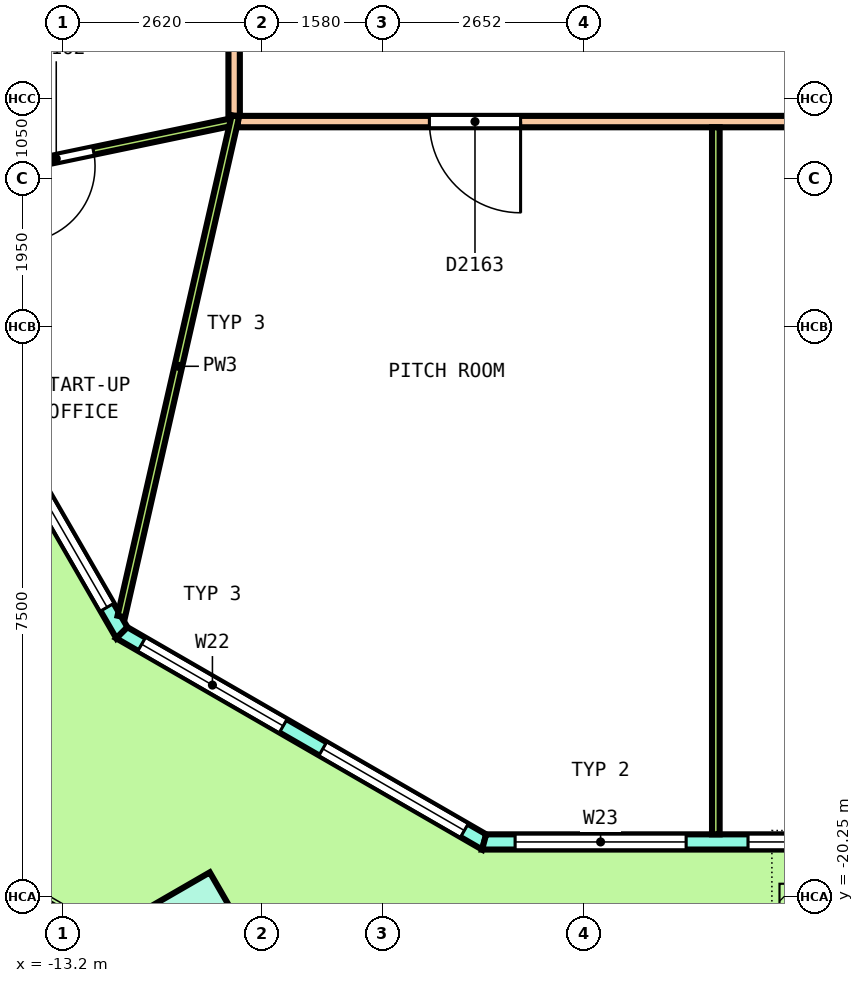
"""IFC4 building model, lengths in metres.
Left out: names, types, materials, properties, quantities, classifications, styles, units other than length and angle.
Written with IfcOpenShell. Run it as: python <this file> out.ifc"""

import sys

from ifc_helpers import new_model, si_unit, direction, frame, frame_2d, origin, origin_2d, place, context, subcontext, project, spatial, polyline, rectangle, outline, extrude, element, fill, save


model = new_model("IFC4")
c1 = context("Model", 3, precision=1e-05, world=origin(), true_north=direction((0.0, 1.0)))
c2 = subcontext(c1, "Body", "Model", "MODEL_VIEW")
j1 = project(units=[si_unit("LENGTHUNIT", "METRE"), si_unit("PLANEANGLEUNIT", "RADIAN")], contexts=[c1])
p1 = place(None, origin())
s1 = spatial("IfcSite", under=j1, at=p1, CompositionType="ELEMENT")
p2 = place(p1, origin())
s2 = spatial("IfcBuilding", under=s1, at=p2, CompositionType="ELEMENT")
p3 = place(p2, frame((0.0, 0.0, 275.0)))
s3 = spatial("IfcBuildingStorey", under=s2, at=p3, CompositionType="ELEMENT", Elevation=275.0)
p4 = place(p3, frame((-11.444, -20.576, 0.0), z_axis=(0.018115165867, -0.031417446337, 0.999342176049), x_axis=(0.865519692755, -0.499889378995, -0.031404939456)))
e1 = element("IfcColumn", 1, at=p4, inside=s3, PredefinedType="COLUMN", context=c2, shape_type="SweptSolid", body=[
    extrude(rectangle(XDim=0.95, YDim=0.95, at=origin_2d()), origin(), (0.0, 0.0, 1.0), 3.652),
])
p5 = place(p3, frame((-20.741, -2.375, 0.0), z_axis=(0.0, 0.0, 1.0), x_axis=(0.499993580544, -0.866029110027, 0.0)))
e2 = element("IfcWall", 2, at=p5, inside=s3, PredefinedType="SOLIDWALL", context=c2, shape_type="SweptSolid", body=[
    extrude(outline(polyline([(-0.027, -0.1), (1.016, -0.1), (2.058, -0.1), (3.101, -0.1), (4.144, -0.1), (5.186, -0.1), (6.229, -0.1), (7.272, -0.1), (8.314, -0.1), (9.357, -0.1), (10.4, -0.1), (11.442, -0.1), (12.485, -0.1), (13.528, -0.1), (14.57, -0.1), (15.613, -0.1), (16.656, -0.1), (16.602, 0.1), (15.566, 0.1), (14.53, 0.1), (13.494, 0.1), (12.458, 0.1), (11.422, 0.1), (10.386, 0.1), (9.35, 0.1), (8.314, 0.1), (7.278, 0.1), (6.242, 0.1), (5.207, 0.1), (4.171, 0.1), (3.135, 0.1), (2.099, 0.1), (1.063, 0.1), (0.027, 0.1), (-0.027, -0.1)])), origin(), (0.0, 0.0, 1.0), 3.7),
])
p6 = place(p5, frame((0.388, 0.0, 0.1)))
e3 = element("IfcOpeningElement", 3, at=p6, cuts=e2, PredefinedType="OPENING", context=c2, shape_type="SweptSolid", body=[
    extrude(rectangle(XDim=2.55, YDim=2.75, at=frame_2d((1.275, 1.375))), frame((0.0, 0.11, 0.0), z_axis=(0.0, -1.0, 0.0), x_axis=(1.0, 0.0, 0.0)), (0.0, 0.0, 1.0), 0.22),
])
p7 = place(p5, frame((3.714, 0.0, 0.1)))
e4 = element("IfcOpeningElement", 4, at=p7, cuts=e2, PredefinedType="OPENING", context=c2, shape_type="SweptSolid", body=[
    extrude(rectangle(XDim=2.55, YDim=2.75, at=frame_2d((1.275, 1.375))), frame((0.0, 0.11, 0.0), z_axis=(0.0, -1.0, 0.0), x_axis=(1.0, 0.0, 0.0)), (0.0, 0.0, 1.0), 0.22),
])
p8 = place(p5, frame((7.414, 0.0, 0.0)))
e5 = element("IfcOpeningElement", 5, at=p8, cuts=e2, PredefinedType="OPENING", context=c2, shape_type="SweptSolid", body=[
    extrude(rectangle(XDim=1.8, YDim=2.4, at=frame_2d((0.9, 1.2))), frame((0.0, 0.11, 0.0), z_axis=(0.0, -1.0, 0.0), x_axis=(1.0, 0.0, 0.0)), (0.0, 0.0, 1.0), 0.22),
])
p9 = place(p5, frame((7.414, 0.0, 2.55)))
e6 = element("IfcOpeningElement", 6, at=p9, cuts=e2, PredefinedType="OPENING", context=c2, shape_type="SweptSolid", body=[
    extrude(rectangle(XDim=1.8, YDim=0.3, at=frame_2d((0.9, 0.15))), frame((0.0, 0.11, 0.0), z_axis=(0.0, -1.0, 0.0), x_axis=(1.0, 0.0, 0.0)), (0.0, 0.0, 1.0), 0.22),
])
p10 = place(p5, frame((10.365, 0.0, 0.1)))
e7 = element("IfcOpeningElement", 7, at=p10, cuts=e2, PredefinedType="OPENING", context=c2, shape_type="SweptSolid", body=[
    extrude(rectangle(XDim=2.55, YDim=2.75, at=frame_2d((1.275, 1.375))), frame((0.0, 0.11, 0.0), z_axis=(0.0, -1.0, 0.0), x_axis=(1.0, 0.0, 0.0)), (0.0, 0.0, 1.0), 0.22),
])
p11 = place(p5, frame((13.691, 0.0, 0.1)))
e8 = element("IfcOpeningElement", 8, at=p11, cuts=e2, PredefinedType="OPENING", context=c2, shape_type="SweptSolid", body=[
    extrude(rectangle(XDim=2.55, YDim=2.75, at=frame_2d((1.275, 1.375))), frame((0.0, 0.11, 0.0), z_axis=(0.0, -1.0, 0.0), x_axis=(1.0, 0.0, 0.0)), (0.0, 0.0, 1.0), 0.22),
])
p12 = place(p3, frame((-12.427, -16.775, 0.0), z_axis=(0.0, 0.0, 1.0), x_axis=(0.866026017613, -0.499998936816, 0.0)))
e9 = element("IfcWall", 9, at=p12, inside=s3, PredefinedType="SOLIDWALL", context=c2, shape_type="SweptSolid", body=[
    extrude(outline(polyline([(-0.027, -0.1), (1.084, -0.1), (2.196, -0.1), (3.307, -0.1), (4.419, -0.1), (5.53, -0.1), (5.477, 0.1), (4.387, 0.1), (3.297, 0.1), (2.207, 0.1), (1.117, 0.1), (0.027, 0.1), (-0.027, -0.1)])), origin(), (0.0, 0.0, 1.0), 3.7),
])
p13 = place(p12, frame((0.301, 0.0, 0.1)))
e10 = element("IfcOpeningElement", 10, at=p13, cuts=e9, PredefinedType="OPENING", context=c2, shape_type="SweptSolid", body=[
    extrude(rectangle(XDim=2.15, YDim=2.75, at=frame_2d((1.075, 1.375))), frame((0.0, 0.11, 0.0), z_axis=(0.0, -1.0, 0.0), x_axis=(1.0, 0.0, 0.0)), (0.0, 0.0, 1.0), 0.22),
])
p14 = place(p12, frame((3.052, 0.0, 0.1)))
e11 = element("IfcOpeningElement", 11, at=p14, cuts=e9, PredefinedType="OPENING", context=c2, shape_type="SweptSolid", body=[
    extrude(rectangle(XDim=2.15, YDim=2.75, at=frame_2d((1.075, 1.375))), frame((0.0, 0.11, 0.0), z_axis=(0.0, -1.0, 0.0), x_axis=(1.0, 0.0, 0.0)), (0.0, 0.0, 1.0), 0.22),
])
p15 = place(p3, frame((-7.661, -19.527, 0.0), z_axis=(0.0, 0.0, 1.0), x_axis=(1.0, 0.0, 0.0)))
e12 = element("IfcWall", 12, at=p15, inside=s3, PredefinedType="SOLIDWALL", context=c2, shape_type="SweptSolid", body=[
    extrude(outline(polyline([(-0.027, -0.1), (0.998, -0.1), (2.023, -0.1), (3.048, -0.1), (4.073, -0.1), (5.098, -0.1), (6.124, -0.1), (7.149, -0.1), (8.174, -0.1), (9.199, -0.1), (10.224, -0.1), (11.249, -0.1), (12.274, -0.1), (13.299, -0.1), (14.324, -0.1), (15.349, -0.1), (15.295, 0.1), (14.278, 0.1), (13.26, 0.1), (12.242, 0.1), (11.224, 0.1), (10.206, 0.1), (9.188, 0.1), (8.17, 0.1), (7.152, 0.1), (6.134, 0.1), (5.116, 0.1), (4.098, 0.1), (3.081, 0.1), (2.063, 0.1), (1.045, 0.1), (0.027, 0.1), (-0.027, -0.1)])), origin(), (0.0, 0.0, 1.0), 3.7),
])
p16 = place(p15, frame((0.407, 0.0, 0.1)))
e13 = element("IfcOpeningElement", 13, at=p16, cuts=e12, PredefinedType="OPENING", context=c2, shape_type="SweptSolid", body=[
    extrude(rectangle(XDim=2.25, YDim=2.75, at=frame_2d((1.125, 1.375))), frame((0.0, 0.11, 0.0), z_axis=(0.0, -1.0, 0.0), x_axis=(1.0, 0.0, 0.0)), (0.0, 0.0, 1.0), 0.22),
])
p17 = place(p15, frame((3.472, 0.0, 0.1)))
e14 = element("IfcOpeningElement", 14, at=p17, cuts=e12, PredefinedType="OPENING", context=c2, shape_type="SweptSolid", body=[
    extrude(rectangle(XDim=2.25, YDim=2.75, at=frame_2d((1.125, 1.375))), frame((0.0, 0.11, 0.0), z_axis=(0.0, -1.0, 0.0), x_axis=(1.0, 0.0, 0.0)), (0.0, 0.0, 1.0), 0.22),
])
p18 = place(p15, frame((6.761, 0.0, 0.0)))
e15 = element("IfcOpeningElement", 15, at=p18, cuts=e12, PredefinedType="OPENING", context=c2, shape_type="SweptSolid", body=[
    extrude(rectangle(XDim=1.8, YDim=2.4, at=frame_2d((0.9, 1.2))), frame((0.0, 0.11, 0.0), z_axis=(0.0, -1.0, 0.0), x_axis=(1.0, 0.0, 0.0)), (0.0, 0.0, 1.0), 0.22),
])
p19 = place(p15, frame((6.761, 0.0, 2.55)))
e16 = element("IfcOpeningElement", 16, at=p19, cuts=e12, PredefinedType="OPENING", context=c2, shape_type="SweptSolid", body=[
    extrude(rectangle(XDim=1.8, YDim=0.3, at=frame_2d((0.9, 0.15))), frame((0.0, 0.11, 0.0), z_axis=(0.0, -1.0, 0.0), x_axis=(1.0, 0.0, 0.0)), (0.0, 0.0, 1.0), 0.22),
])
p20 = place(p15, frame((9.601, 0.0, 0.1)))
e17 = element("IfcOpeningElement", 17, at=p20, cuts=e12, PredefinedType="OPENING", context=c2, shape_type="SweptSolid", body=[
    extrude(rectangle(XDim=2.25, YDim=2.75, at=frame_2d((1.125, 1.375))), frame((0.0, 0.11, 0.0), z_axis=(0.0, -1.0, 0.0), x_axis=(1.0, 0.0, 0.0)), (0.0, 0.0, 1.0), 0.22),
])
p21 = place(p15, frame((12.665, 0.0, 0.1)))
e18 = element("IfcOpeningElement", 18, at=p21, cuts=e12, PredefinedType="OPENING", context=c2, shape_type="SweptSolid", body=[
    extrude(rectangle(XDim=2.25, YDim=2.75, at=frame_2d((1.125, 1.375))), frame((0.0, 0.11, 0.0), z_axis=(0.0, -1.0, 0.0), x_axis=(1.0, 0.0, 0.0)), (0.0, 0.0, 1.0), 0.22),
])
p22 = place(p3, frame((-10.95, -9.975, 0.0), z_axis=(0.0, 0.0, 1.0), x_axis=(0.0, 1.0, 0.0)))
e19 = element("IfcWall", 19, at=p22, inside=s3, PredefinedType="PARTITIONING", context=c2, shape_type="SweptSolid", body=[
    extrude(rectangle(XDim=17.15, YDim=0.15, at=frame_2d((8.575, 0.0))), origin(), (0.0, 0.0, 1.0), 2.9),
])
p23 = place(p22, frame((13.004, 0.0, 0.0)))
e20 = element("IfcOpeningElement", 20, at=p23, cuts=e19, PredefinedType="OPENING", context=c2, shape_type="SweptSolid", body=[
    extrude(rectangle(XDim=1.2, YDim=2.1, at=frame_2d((0.6, 1.05))), frame((0.0, 0.085, 0.0), z_axis=(0.0, -1.0, 0.0), x_axis=(1.0, 0.0, 0.0)), (0.0, 0.0, 1.0), 0.17),
])
p24 = place(p22, frame((7.86, 0.0, 0.0)))
e21 = element("IfcOpeningElement", 21, at=p24, cuts=e19, PredefinedType="OPENING", context=c2, shape_type="SweptSolid", body=[
    extrude(rectangle(XDim=1.2, YDim=2.1, at=frame_2d((0.6, 1.05))), frame((0.0, 0.085, 0.0), z_axis=(0.0, -1.0, 0.0), x_axis=(1.0, 0.0, 0.0)), (0.0, 0.0, 1.0), 0.17),
])
p25 = place(p22, frame((2.263, 0.0, 0.0)))
e22 = element("IfcOpeningElement", 22, at=p25, cuts=e19, PredefinedType="OPENING", context=c2, shape_type="SweptSolid", body=[
    extrude(rectangle(XDim=1.0, YDim=2.1, at=frame_2d((0.5, 1.05))), frame((0.0, 0.085, 0.0), z_axis=(0.0, -1.0, 0.0), x_axis=(1.0, 0.0, 0.0)), (0.0, 0.0, 1.0), 0.17),
])
p26 = place(p3, frame((-10.9, -10.05, 0.0), z_axis=(0.0, 0.0, 1.0), x_axis=(1.0, 0.0, 0.0)))
e23 = element("IfcWall", 23, at=p26, inside=s3, PredefinedType="PARTITIONING", context=c2, shape_type="SweptSolid", body=[
    extrude(rectangle(XDim=21.925, YDim=0.15, at=frame_2d((10.962, 0.0))), origin(), (0.0, 0.0, 1.0), 2.9),
])
p27 = place(p26, frame((2.519, 0.0, 0.0)))
e24 = element("IfcOpeningElement", 24, at=p27, cuts=e23, PredefinedType="OPENING", context=c2, shape_type="SweptSolid", body=[
    extrude(rectangle(XDim=1.2, YDim=2.1, at=frame_2d((0.6, 1.05))), frame((0.0, 0.085, 0.0), z_axis=(0.0, -1.0, 0.0), x_axis=(1.0, 0.0, 0.0)), (0.0, 0.0, 1.0), 0.17),
])
p28 = place(p26, frame((9.201, 0.0, 0.0)))
e25 = element("IfcOpeningElement", 25, at=p28, cuts=e23, PredefinedType="OPENING", context=c2, shape_type="SweptSolid", body=[
    extrude(rectangle(XDim=1.2, YDim=2.1, at=frame_2d((0.6, 1.05))), frame((0.0, 0.085, 0.0), z_axis=(0.0, -1.0, 0.0), x_axis=(1.0, 0.0, 0.0)), (0.0, 0.0, 1.0), 0.17),
])
p29 = place(p26, frame((16.757, 0.0, 0.0)))
e26 = element("IfcOpeningElement", 26, at=p29, cuts=e23, PredefinedType="OPENING", context=c2, shape_type="SweptSolid", body=[
    extrude(rectangle(XDim=1.0, YDim=2.1, at=frame_2d((0.5, 1.05))), frame((0.0, 0.085, 0.0), z_axis=(0.0, -1.0, 0.0), x_axis=(1.0, 0.0, 0.0)), (0.0, 0.0, 1.0), 0.17),
])
p30 = place(p3, frame((-15.631, -11.027, 0.0), z_axis=(0.0, 0.0, 1.0), x_axis=(0.978925870139, 0.204215917041, 0.0)))
e27 = element("IfcWall", 27, at=p30, inside=s3, PredefinedType="PARTITIONING", context=c2, shape_type="SweptSolid", body=[
    extrude(rectangle(XDim=4.732, YDim=0.1, at=frame_2d((2.366, 0.0))), origin(), (0.0, 0.0, 1.0), 2.9),
])
p31 = place(p30, frame((1.891, 0.0, 0.0)))
e28 = element("IfcOpeningElement", 28, at=p31, cuts=e27, PredefinedType="OPENING", context=c2, shape_type="SweptSolid", body=[
    extrude(rectangle(XDim=1.0, YDim=2.1, at=frame_2d((0.5, 1.05))), frame((0.0, 0.06, 0.0), z_axis=(0.0, -1.0, 0.0), x_axis=(1.0, 0.0, 0.0)), (0.0, 0.0, 1.0), 0.12),
])
p32 = place(p3, frame((-12.435, -16.562, 0.0), z_axis=(0.0, 0.0, 1.0), x_axis=(0.222335019578, 0.974970327276, 0.0)))
e29 = element("IfcWall", 29, at=p32, inside=s3, PredefinedType="PARTITIONING", context=c2, shape_type="SweptSolid", body=[
    extrude(rectangle(XDim=6.754, YDim=0.1, at=frame_2d((3.377, 0.0))), origin(), (0.0, 0.0, 1.0), 2.9),
])
p33 = place(p3, frame((-4.613, -19.427, 0.0), z_axis=(0.0, 0.0, 1.0), x_axis=(0.0, 1.0, 0.0)))
e30 = element("IfcWall", 30, at=p33, inside=s3, PredefinedType="PARTITIONING", context=c2, shape_type="SweptSolid", body=[
    extrude(rectangle(XDim=9.302, YDim=0.1, at=frame_2d((4.651, 0.0))), origin(), (0.0, 0.0, 1.0), 2.9),
])
p34 = place(p11, origin())
e31 = element("IfcWindow", 31, at=p34, inside=s3, PartitioningType="SINGLE_PANEL", PredefinedType="WINDOW", context=c2, shape_type="SweptSolid", body=[
    extrude(rectangle(XDim=2.55, YDim=2.75, at=frame_2d((1.275, 1.375))), frame((0.0, 0.03, 0.0), z_axis=(0.0, -1.0, 0.0), x_axis=(1.0, 0.0, 0.0)), (0.0, 0.0, 1.0), 0.06),
])
fill(e8, e31)
p35 = place(p13, origin())
e32 = element("IfcWindow", 32, at=p35, inside=s3, PartitioningType="SINGLE_PANEL", PredefinedType="WINDOW", context=c2, shape_type="SweptSolid", body=[
    extrude(rectangle(XDim=2.15, YDim=2.75, at=frame_2d((1.075, 1.375))), frame((0.0, 0.03, 0.0), z_axis=(0.0, -1.0, 0.0), x_axis=(1.0, 0.0, 0.0)), (0.0, 0.0, 1.0), 0.06),
])
fill(e10, e32)
p36 = place(p14, origin())
e33 = element("IfcWindow", 33, at=p36, inside=s3, PartitioningType="SINGLE_PANEL", PredefinedType="WINDOW", context=c2, shape_type="SweptSolid", body=[
    extrude(rectangle(XDim=2.15, YDim=2.75, at=frame_2d((1.075, 1.375))), frame((0.0, 0.03, 0.0), z_axis=(0.0, -1.0, 0.0), x_axis=(1.0, 0.0, 0.0)), (0.0, 0.0, 1.0), 0.06),
])
fill(e11, e33)
p37 = place(p16, origin())
e34 = element("IfcWindow", 34, at=p37, inside=s3, PartitioningType="SINGLE_PANEL", PredefinedType="WINDOW", context=c2, shape_type="SweptSolid", body=[
    extrude(rectangle(XDim=2.25, YDim=2.75, at=frame_2d((1.125, 1.375))), frame((0.0, 0.03, 0.0), z_axis=(0.0, -1.0, 0.0), x_axis=(1.0, 0.0, 0.0)), (0.0, 0.0, 1.0), 0.06),
])
fill(e13, e34)
p38 = place(p17, origin())
e35 = element("IfcWindow", 35, at=p38, inside=s3, PartitioningType="SINGLE_PANEL", PredefinedType="WINDOW", context=c2, shape_type="SweptSolid", body=[
    extrude(rectangle(XDim=2.25, YDim=2.75, at=frame_2d((1.125, 1.375))), frame((0.0, 0.03, 0.0), z_axis=(0.0, -1.0, 0.0), x_axis=(1.0, 0.0, 0.0)), (0.0, 0.0, 1.0), 0.06),
])
fill(e14, e35)
p39 = place(p31, origin())
e36 = element("IfcDoor", 36, at=p39, inside=s3, OperationType="SINGLE_SWING_LEFT", PredefinedType="DOOR", context=c2, shape_type="SweptSolid", body=[
    extrude(rectangle(XDim=1.0, YDim=2.1, at=frame_2d((0.5, 1.05))), frame((0.0, 0.025, 0.0), z_axis=(0.0, -1.0, 0.0), x_axis=(1.0, 0.0, 0.0)), (0.0, 0.0, 1.0), 0.05),
])
fill(e28, e36)
p40 = place(p27, origin())
e37 = element("IfcDoor", 37, at=p40, inside=s3, OperationType="DOUBLE_DOOR_SINGLE_SWING", PredefinedType="DOOR", context=c2, shape_type="SweptSolid", body=[
    extrude(rectangle(XDim=1.2, YDim=2.1, at=frame_2d((0.6, 1.05))), frame((0.0, 0.025, 0.0), z_axis=(0.0, -1.0, 0.0), x_axis=(1.0, 0.0, 0.0)), (0.0, 0.0, 1.0), 0.05),
])
fill(e24, e37)
save(model, sys.argv[1])
